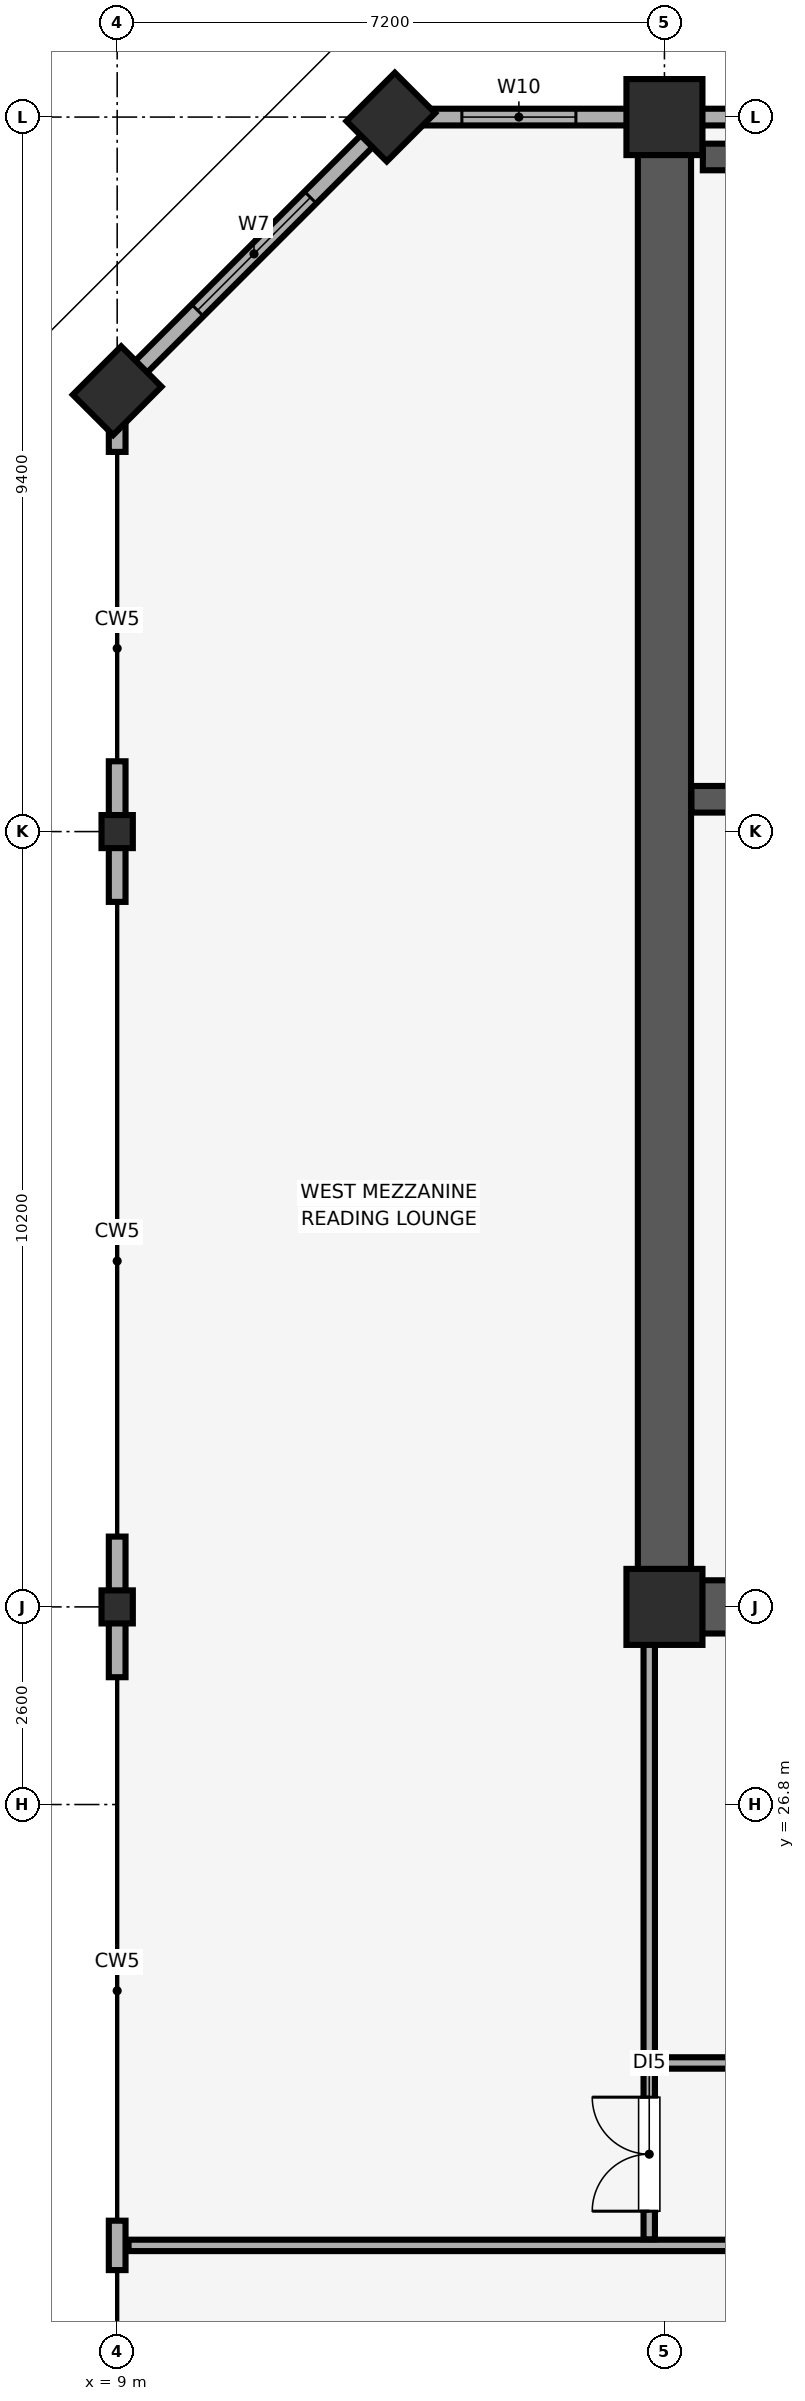
"""IFC4 building model, lengths in metres.
Left out: names, types, materials, properties, quantities, classifications, styles, units other than length and angle.
Written with IfcOpenShell. Run it as: python <this file> out.ifc"""

import sys

from ifc_helpers import new_model, si_unit, direction, frame, frame_2d, origin, origin_2d, place, context, subcontext, project, spatial, rectangle, i_section, extrude, element, fill, save


model = new_model("IFC4")
c1 = context("Model", 3, precision=1e-05, world=origin(), true_north=direction((0.0, 1.0)))
c2 = subcontext(c1, "Body", "Model", "MODEL_VIEW")
j1 = project(units=[si_unit("LENGTHUNIT", "METRE"), si_unit("PLANEANGLEUNIT", "RADIAN")], contexts=[c1])
p1 = place(None, origin())
s1 = spatial("IfcSite", under=j1, at=p1, CompositionType="ELEMENT")
p2 = place(p1, origin())
s2 = spatial("IfcBuilding", under=s1, at=p2, CompositionType="ELEMENT")
p3 = place(p2, frame((0.0, 0.0, 300.2)))
s3 = spatial("IfcBuildingStorey", under=s2, at=p3, CompositionType="ELEMENT", Elevation=300.2)
for number, where, z_axis, x_axis in (
    (1, (9.0, 29.4, 0.0), (0.0, 0.0, 1.0), (1.0, 0.0, 0.0)),
    (2, (9.0, 39.6, 0.0), (0.0, 0.0, 1.0), (1.0, 0.0, 0.0)),
):
    element("IfcColumn", number, at=place(p3, frame(where, z_axis=z_axis, x_axis=x_axis)), inside=s3, PredefinedType="COLUMN", context=c2, shape_type="SweptSolid", body=[
        extrude(i_section(OverallWidth=0.412, OverallDepth=0.435, WebThickness=0.036, FlangeThickness=0.056, FilletRadius=0.015, at=origin_2d()), origin(), (0.0, 0.0, 1.0), 5.12),
    ])
for number, where, z_axis, x_axis in (
    (3, (12.6, 49.0, 0.0), (0.0, 0.0, 1.0), (0.707, 0.707, 0.0)),
    (4, (9.0, 45.4, 0.0), (0.0, 0.0, 1.0), (0.707, 0.707, 0.0)),
):
    element("IfcColumn", number, at=place(p3, frame(where, z_axis=z_axis, x_axis=x_axis)), inside=s3, PredefinedType="PILASTER", context=c2, shape_type="SweptSolid", body=[
        extrude(rectangle(XDim=0.9, YDim=0.75, at=origin_2d()), origin(), (0.0, 0.0, 1.0), 5.12),
    ])
for number, where, z_axis, x_axis in (
    (5, (16.2, 29.4, 0.0), (0.0, 0.0, 1.0), (1.0, 0.0, 0.0)),
    (6, (16.2, 49.0, 0.0), (0.0, 0.0, 1.0), (1.0, 0.0, 0.0)),
):
    element("IfcColumn", number, at=place(p3, frame(where, z_axis=z_axis, x_axis=x_axis)), inside=s3, PredefinedType="COLUMN", context=c2, shape_type="SweptSolid", body=[
        extrude(rectangle(XDim=1.0, YDim=1.0, at=origin_2d()), origin(), (0.0, 0.0, 1.0), 5.12),
    ])
p4 = place(p3, frame((71.4, 49.0, 0.0), z_axis=(0.0, 0.0, 1.0), x_axis=(-1.0, 0.0, 0.0)))
e7 = element("IfcWall", 7, at=p4, inside=s3, PredefinedType="SOLIDWALL", context=c2, shape_type="SweptSolid", body=[
    extrude(rectangle(XDim=58.8, YDim=0.22, at=frame_2d((29.4, 0.0))), origin(), (0.0, 0.0, 1.0), 4.32),
])
p5 = place(p4, frame((56.365, 0.0, 0.85)))
e8 = element("IfcOpeningElement", 8, at=p5, cuts=e7, PredefinedType="OPENING", context=c2, shape_type="SweptSolid", body=[
    extrude(rectangle(XDim=1.5, YDim=1.4, at=frame_2d((0.75, 0.7))), frame((0.0, 0.12, 0.0), z_axis=(0.0, -1.0, 0.0), x_axis=(1.0, 0.0, 0.0)), (0.0, 0.0, 1.0), 0.24),
])
p6 = place(p4, frame((0.935, 0.0, 0.85)))
e9 = element("IfcOpeningElement", 9, at=p6, cuts=e7, PredefinedType="OPENING", context=c2, shape_type="SweptSolid", body=[
    extrude(rectangle(XDim=1.5, YDim=1.4, at=frame_2d((0.75, 0.7))), frame((0.0, 0.12, 0.0), z_axis=(0.0, -1.0, 0.0), x_axis=(1.0, 0.0, 0.0)), (0.0, 0.0, 1.0), 0.24),
])
p7 = place(p4, frame((41.915, 0.0, 0.9)))
e10 = element("IfcOpeningElement", 10, at=p7, cuts=e7, PredefinedType="OPENING", context=c2, shape_type="SweptSolid", body=[
    extrude(rectangle(XDim=3.6, YDim=1.5, at=frame_2d((1.8, 0.75))), frame((0.0, 0.12, 0.0), z_axis=(0.0, -1.0, 0.0), x_axis=(1.0, 0.0, 0.0)), (0.0, 0.0, 1.0), 0.24),
])
p8 = place(p4, frame((36.85, 0.0, 0.9)))
e11 = element("IfcOpeningElement", 11, at=p8, cuts=e7, PredefinedType="OPENING", context=c2, shape_type="SweptSolid", body=[
    extrude(rectangle(XDim=3.0, YDim=1.5, at=frame_2d((1.5, 0.75))), frame((0.0, 0.12, 0.0), z_axis=(0.0, -1.0, 0.0), x_axis=(1.0, 0.0, 0.0)), (0.0, 0.0, 1.0), 0.24),
])
p9 = place(p4, frame((19.7, 0.0, 0.9)))
e12 = element("IfcOpeningElement", 12, at=p9, cuts=e7, PredefinedType="OPENING", context=c2, shape_type="SweptSolid", body=[
    extrude(rectangle(XDim=3.6, YDim=1.5, at=frame_2d((1.8, 0.75))), frame((0.0, 0.12, 0.0), z_axis=(0.0, -1.0, 0.0), x_axis=(1.0, 0.0, 0.0)), (0.0, 0.0, 1.0), 0.24),
])
p10 = place(p4, frame((14.635, 0.0, 0.9)))
e13 = element("IfcOpeningElement", 13, at=p10, cuts=e7, PredefinedType="OPENING", context=c2, shape_type="SweptSolid", body=[
    extrude(rectangle(XDim=2.4, YDim=1.5, at=frame_2d((1.2, 0.75))), frame((0.0, 0.12, 0.0), z_axis=(0.0, -1.0, 0.0), x_axis=(1.0, 0.0, 0.0)), (0.0, 0.0, 1.0), 0.24),
])
p11 = place(p3, frame((12.6, 49.0, 0.0), z_axis=(0.0, 0.0, 1.0), x_axis=(-0.707106781187, -0.707106781187, 0.0)))
e14 = element("IfcWall", 14, at=p11, inside=s3, PredefinedType="SOLIDWALL", context=c2, shape_type="SweptSolid", body=[
    extrude(rectangle(XDim=5.091, YDim=0.22, at=frame_2d((2.546, 0.0))), origin(), (0.0, 0.0, 1.0), 4.32),
])
p12 = place(p11, frame((1.496, 0.0, 0.85)))
e15 = element("IfcOpeningElement", 15, at=p12, cuts=e14, PredefinedType="OPENING", context=c2, shape_type="SweptSolid", body=[
    extrude(rectangle(XDim=2.1, YDim=1.6, at=frame_2d((1.05, 0.8))), frame((0.0, 0.12, 0.0), z_axis=(0.0, -1.0, 0.0), x_axis=(1.0, 0.0, 0.0)), (0.0, 0.0, 1.0), 0.24),
])
p13 = place(p3, frame((9.0, 45.4, 0.0), z_axis=(0.0, 0.0, 1.0), x_axis=(0.0, -1.0, 0.0)))
e16 = element("IfcWall", 16, at=p13, inside=s3, PredefinedType="SOLIDWALL", context=c2, shape_type="SweptSolid", body=[
    extrude(rectangle(XDim=0.805, YDim=0.22, at=frame_2d((0.402, 0.0))), origin(), (0.0, 0.0, 1.0), 5.12),
])
for number, where, z_axis, x_axis in (
    (17, (9.0, 40.525, 0.0), (0.0, 0.0, 1.0), (0.0, -1.0, 0.0)),
    (18, (9.0, 30.325, 0.0), (0.0, 0.0, 1.0), (0.0, -1.0, 0.0)),
):
    element("IfcWall", number, at=place(p3, frame(where, z_axis=z_axis, x_axis=x_axis)), inside=s3, PredefinedType="SOLIDWALL", context=c2, shape_type="SweptSolid", body=[
        extrude(rectangle(XDim=1.85, YDim=0.22, at=frame_2d((0.925, 0.0))), origin(), (0.0, 0.0, 1.0), 4.32),
    ])
p14 = place(p3, frame((9.0, 21.325, 0.0), z_axis=(0.0, 0.0, 1.0), x_axis=(0.0, -1.0, 0.0)))
e19 = element("IfcWall", 19, at=p14, inside=s3, PredefinedType="SOLIDWALL", context=c2, shape_type="SweptSolid", body=[
    extrude(rectangle(XDim=0.65, YDim=0.22, at=frame_2d((0.325, 0.0))), origin(), (0.0, 0.0, 1.0), 4.32),
])
p15 = place(p3, frame((16.2, 29.4, 0.0), z_axis=(0.0, 0.0, 1.0), x_axis=(0.0, 1.0, 0.0)))
e20 = element("IfcWall", 20, at=p15, inside=s3, PredefinedType="SHEAR", context=c2, shape_type="SweptSolid", body=[
    extrude(rectangle(XDim=19.2, YDim=0.7, at=frame_2d((9.6, 0.0))), origin(), (0.0, 0.0, 1.0), 5.12),
])
p16 = place(p3, frame((16.555, 29.4, 0.0), z_axis=(0.0, 0.0, 1.0), x_axis=(1.0, 0.0, 0.0)))
e21 = element("IfcWall", 21, at=p16, inside=s3, PredefinedType="SHEAR", context=c2, shape_type="SweptSolid", body=[
    extrude(rectangle(XDim=7.045, YDim=0.7, at=frame_2d((3.522, 0.0))), origin(), (0.0, 0.0, 1.0), 5.12),
])
p17 = place(p3, frame((16.555, 40.025, 0.0), z_axis=(0.0, 0.0, 1.0), x_axis=(1.0, 0.0, 0.0)))
e22 = element("IfcWall", 22, at=p17, inside=s3, PredefinedType="SHEAR", context=c2, shape_type="SweptSolid", body=[
    extrude(rectangle(XDim=4.3, YDim=0.35, at=frame_2d((2.15, 0.0))), origin(), (0.0, 0.0, 1.0), 5.12),
])
p18 = place(p17, frame((1.91, 0.0, 0.0)))
e23 = element("IfcOpeningElement", 23, at=p18, cuts=e22, PredefinedType="OPENING", context=c2, shape_type="SweptSolid", body=[
    extrude(rectangle(XDim=1.15, YDim=2.15, at=frame_2d((0.575, 1.075))), frame((0.0, 0.185, 0.0), z_axis=(0.0, -1.0, 0.0), x_axis=(1.0, 0.0, 0.0)), (0.0, 0.0, 1.0), 0.37),
])
p19 = place(p3, frame((16.705, 48.475, 0.0), z_axis=(0.0, 0.0, 1.0), x_axis=(1.0, 0.0, 0.0)))
e24 = element("IfcWall", 24, at=p19, inside=s3, PredefinedType="SHEAR", context=c2, shape_type="SweptSolid", body=[
    extrude(rectangle(XDim=4.15, YDim=0.35, at=frame_2d((2.075, 0.0))), origin(), (0.0, 0.0, 1.0), 5.12),
])
p20 = place(p3, frame((9.15, 21.0, 0.0), z_axis=(0.0, 0.0, 1.0), x_axis=(1.0, 0.0, 0.0)))
e25 = element("IfcWall", 25, at=p20, inside=s3, PredefinedType="PARTITIONING", context=c2, shape_type="SweptSolid", body=[
    extrude(rectangle(XDim=29.05, YDim=0.15, at=frame_2d((14.525, 0.0))), origin(), (0.0, 0.0, 1.0), 5.12),
])
p21 = place(p20, frame((17.1, 0.0, 0.0)))
e26 = element("IfcOpeningElement", 26, at=p21, cuts=e25, PredefinedType="OPENING", context=c2, shape_type="SweptSolid", body=[
    extrude(rectangle(XDim=1.5, YDim=2.25, at=frame_2d((0.75, 1.125))), frame((0.0, 0.085, 0.0), z_axis=(0.0, -1.0, 0.0), x_axis=(1.0, 0.0, 0.0)), (0.0, 0.0, 1.0), 0.17),
])
p22 = place(p3, frame((16.0, 23.4, 0.0), z_axis=(0.0, 0.0, 1.0), x_axis=(1.0, 0.0, 0.0)))
e27 = element("IfcWall", 27, at=p22, inside=s3, PredefinedType="PARTITIONING", context=c2, shape_type="SweptSolid", body=[
    extrude(rectangle(XDim=23.8, YDim=0.15, at=frame_2d((11.9, 0.0))), origin(), (0.0, 0.0, 1.0), 5.12),
])
p23 = place(p22, frame((10.5, 0.0, 0.0)))
e28 = element("IfcOpeningElement", 28, at=p23, cuts=e27, PredefinedType="OPENING", context=c2, shape_type="SweptSolid", body=[
    extrude(rectangle(XDim=1.0, YDim=2.15, at=frame_2d((0.5, 1.075))), frame((0.0, 0.085, 0.0), z_axis=(0.0, -1.0, 0.0), x_axis=(1.0, 0.0, 0.0)), (0.0, 0.0, 1.0), 0.17),
])
p24 = place(p3, frame((16.0, 23.48, 0.0), z_axis=(0.0, 0.0, 1.0), x_axis=(0.0, 1.0, 0.0)))
e29 = element("IfcWall", 29, at=p24, inside=s3, PredefinedType="PARTITIONING", context=c2, shape_type="SweptSolid", body=[
    extrude(rectangle(XDim=5.91, YDim=0.15, at=frame_2d((2.955, 0.0))), origin(), (0.0, 0.0, 1.0), 4.76),
])
p25 = place(p3, frame((16.0, 21.08, 0.0), z_axis=(0.0, 0.0, 1.0), x_axis=(0.0, 1.0, 0.0)))
e30 = element("IfcWall", 30, at=p25, inside=s3, PredefinedType="PARTITIONING", context=c2, shape_type="SweptSolid", body=[
    extrude(rectangle(XDim=2.24, YDim=0.15, at=frame_2d((1.12, 0.0))), origin(), (0.0, 0.0, 1.0), 4.76),
])
p26 = place(p25, frame((0.37, 0.0, 0.0)))
e31 = element("IfcOpeningElement", 31, at=p26, cuts=e30, PredefinedType="OPENING", context=c2, shape_type="SweptSolid", body=[
    extrude(rectangle(XDim=1.5, YDim=2.25, at=frame_2d((0.75, 1.125))), frame((0.0, 0.085, 0.0), z_axis=(0.0, -1.0, 0.0), x_axis=(1.0, 0.0, 0.0)), (0.0, 0.0, 1.0), 0.17),
])
p27 = place(p12, origin())
e32 = element("IfcWindow", 32, at=p27, inside=s3, PartitioningType="SINGLE_PANEL", PredefinedType="WINDOW", context=c2, shape_type="SweptSolid", body=[
    extrude(rectangle(XDim=2.1, YDim=1.6, at=frame_2d((1.05, 0.8))), frame((0.0, 0.03, 0.0), z_axis=(0.0, -1.0, 0.0), x_axis=(1.0, 0.0, 0.0)), (0.0, 0.0, 1.0), 0.06),
])
fill(e15, e32)
p28 = place(p5, origin())
e33 = element("IfcWindow", 33, at=p28, inside=s3, PartitioningType="SINGLE_PANEL", PredefinedType="WINDOW", context=c2, shape_type="SweptSolid", body=[
    extrude(rectangle(XDim=1.5, YDim=1.4, at=frame_2d((0.75, 0.7))), frame((0.0, 0.03, 0.0), z_axis=(0.0, -1.0, 0.0), x_axis=(1.0, 0.0, 0.0)), (0.0, 0.0, 1.0), 0.06),
])
fill(e8, e33)
p29 = place(p26, origin())
e34 = element("IfcDoor", 34, at=p29, inside=s3, OperationType="DOUBLE_DOOR_SINGLE_SWING", PredefinedType="DOOR", context=c2, shape_type="SweptSolid", body=[
    extrude(rectangle(XDim=1.5, YDim=2.25, at=frame_2d((0.75, 1.125))), frame((0.0, 0.025, 0.0), z_axis=(0.0, -1.0, 0.0), x_axis=(1.0, 0.0, 0.0)), (0.0, 0.0, 1.0), 0.05),
])
fill(e31, e34)
save(model, sys.argv[1])
